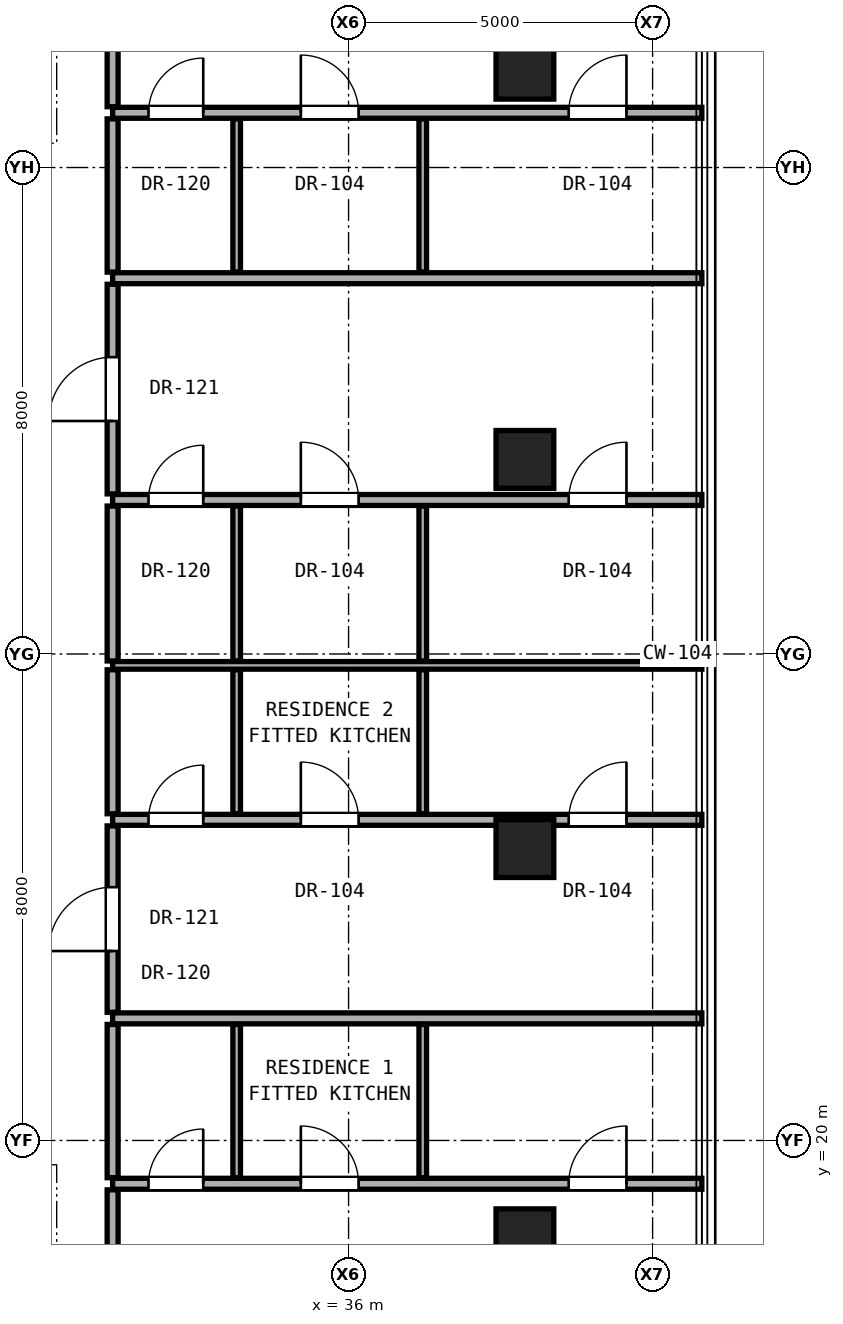
"""IFC4 building model, lengths in metres.
Left out: names, types, materials, properties, quantities, classifications, styles, units other than length and angle.
Written with IfcOpenShell. Run it as: python <this file> out.ifc"""

import sys

from ifc_helpers import new_model, si_unit, direction, frame, frame_2d, origin, origin_2d, place, context, subcontext, project, spatial, rectangle, hollow_rectangle, extrude, element, fill, save


model = new_model("IFC4")
c1 = context("Model", 3, precision=1e-05, world=origin(), true_north=direction((0.0, 1.0)))
c2 = subcontext(c1, "Body", "Model", "MODEL_VIEW")
j1 = project(units=[si_unit("LENGTHUNIT", "METRE"), si_unit("PLANEANGLEUNIT", "RADIAN")], contexts=[c1])
p1 = place(None, origin())
s1 = spatial("IfcSite", under=j1, at=p1, CompositionType="ELEMENT")
p2 = place(p1, origin())
s2 = spatial("IfcBuilding", under=s1, at=p2, CompositionType="ELEMENT")
p3 = place(p2, frame((0.0, 0.0, 173.9)))
s3 = spatial("IfcBuildingStorey", under=s2, at=p3, CompositionType="ELEMENT", Elevation=173.9)
for number, where, z_axis, x_axis in (
    (1, (38.9, 18.4, 0.0), (0.0, 0.0, 1.0), (1.0, 0.0, 0.0)),
    (2, (38.9, 24.8, 0.0), (0.0, 0.0, 1.0), (1.0, 0.0, 0.0)),
    (3, (38.9, 31.2, 0.0), (0.0, 0.0, 1.0), (1.0, 0.0, 0.0)),
    (4, (38.9, 37.6, 0.0), (0.0, 0.0, 1.0), (1.0, 0.0, 0.0)),
):
    element("IfcColumn", number, at=place(p3, frame(where, z_axis=z_axis, x_axis=x_axis)), inside=s3, PredefinedType="COLUMN", context=c2, shape_type="SweptSolid", body=[
        extrude(hollow_rectangle(XDim=0.95, YDim=0.95, WallThickness=0.05, at=origin_2d()), origin(), (0.0, 0.0, 1.0), 3.25),
    ])
p4 = place(p3, frame((32.12, 19.288, 0.0), z_axis=(0.0, 0.0, 1.0), x_axis=(1.0, 0.0, 0.0)))
e5 = element("IfcWall", 5, at=p4, inside=s3, PredefinedType="PARTITIONING", context=c2, shape_type="SweptSolid", body=[
    extrude(rectangle(XDim=9.69, YDim=0.18, at=frame_2d((4.845, 0.0))), origin(), (0.0, 0.0, 1.0), 2.269),
])
p5 = place(p4, frame((7.5, 0.0, 0.0)))
e6 = element("IfcOpeningElement", 6, at=p5, cuts=e5, PredefinedType="OPENING", context=c2, shape_type="SweptSolid", body=[
    extrude(rectangle(XDim=0.95, YDim=2.15, at=frame_2d((0.475, 1.075))), frame((0.0, 0.1, 0.0), z_axis=(0.0, -1.0, 0.0), x_axis=(1.0, 0.0, 0.0)), (0.0, 0.0, 1.0), 0.2),
])
p6 = place(p4, frame((3.095, 0.0, 0.0)))
e7 = element("IfcOpeningElement", 7, at=p6, cuts=e5, PredefinedType="OPENING", context=c2, shape_type="SweptSolid", body=[
    extrude(rectangle(XDim=0.95, YDim=2.15, at=frame_2d((0.475, 1.075))), frame((0.0, 0.1, 0.0), z_axis=(0.0, -1.0, 0.0), x_axis=(1.0, 0.0, 0.0)), (0.0, 0.0, 1.0), 0.2),
])
p7 = place(p4, frame((0.59, 0.0, 0.0)))
e8 = element("IfcOpeningElement", 8, at=p7, cuts=e5, PredefinedType="OPENING", context=c2, shape_type="SweptSolid", body=[
    extrude(rectangle(XDim=0.9, YDim=2.1, at=frame_2d((0.45, 1.05))), frame((0.0, 0.1, 0.0), z_axis=(0.0, -1.0, 0.0), x_axis=(1.0, 0.0, 0.0)), (0.0, 0.0, 1.0), 0.2),
])
p8 = place(p3, frame((32.12, 22.008, 0.0), z_axis=(0.0, 0.0, 1.0), x_axis=(1.0, 0.0, 0.0)))
e9 = element("IfcWall", 9, at=p8, inside=s3, PredefinedType="PARTITIONING", context=c2, shape_type="SweptSolid", body=[
    extrude(rectangle(XDim=9.69, YDim=0.18, at=frame_2d((4.845, 0.0))), origin(), (0.0, 0.0, 1.0), 2.269),
])
p9 = place(p3, frame((32.12, 25.273, 0.0), z_axis=(0.0, 0.0, 1.0), x_axis=(1.0, 0.0, 0.0)))
e10 = element("IfcWall", 10, at=p9, inside=s3, PredefinedType="PARTITIONING", context=c2, shape_type="SweptSolid", body=[
    extrude(rectangle(XDim=9.69, YDim=0.18, at=frame_2d((4.845, 0.0))), origin(), (0.0, 0.0, 1.0), 2.269),
])
p10 = place(p9, frame((7.5, 0.0, 0.0)))
e11 = element("IfcOpeningElement", 11, at=p10, cuts=e10, PredefinedType="OPENING", context=c2, shape_type="SweptSolid", body=[
    extrude(rectangle(XDim=0.95, YDim=2.15, at=frame_2d((0.475, 1.075))), frame((0.0, 0.1, 0.0), z_axis=(0.0, -1.0, 0.0), x_axis=(1.0, 0.0, 0.0)), (0.0, 0.0, 1.0), 0.2),
])
p11 = place(p9, frame((3.095, 0.0, 0.0)))
e12 = element("IfcOpeningElement", 12, at=p11, cuts=e10, PredefinedType="OPENING", context=c2, shape_type="SweptSolid", body=[
    extrude(rectangle(XDim=0.95, YDim=2.15, at=frame_2d((0.475, 1.075))), frame((0.0, 0.1, 0.0), z_axis=(0.0, -1.0, 0.0), x_axis=(1.0, 0.0, 0.0)), (0.0, 0.0, 1.0), 0.2),
])
p12 = place(p9, frame((0.59, 0.0, 0.0)))
e13 = element("IfcOpeningElement", 13, at=p12, cuts=e10, PredefinedType="OPENING", context=c2, shape_type="SweptSolid", body=[
    extrude(rectangle(XDim=0.9, YDim=2.1, at=frame_2d((0.45, 1.05))), frame((0.0, 0.1, 0.0), z_axis=(0.0, -1.0, 0.0), x_axis=(1.0, 0.0, 0.0)), (0.0, 0.0, 1.0), 0.2),
])
p13 = place(p3, frame((32.12, 27.813, 0.0), z_axis=(0.0, 0.0, 1.0), x_axis=(1.0, 0.0, 0.0)))
e14 = element("IfcWall", 14, at=p13, inside=s3, PredefinedType="PARTITIONING", context=c2, shape_type="SweptSolid", body=[
    extrude(rectangle(XDim=9.69, YDim=0.125, at=frame_2d((4.845, 0.0))), origin(), (0.0, 0.0, 1.0), 2.269),
])
p14 = place(p3, frame((32.12, 30.533, 0.0), z_axis=(0.0, 0.0, 1.0), x_axis=(1.0, 0.0, 0.0)))
e15 = element("IfcWall", 15, at=p14, inside=s3, PredefinedType="PARTITIONING", context=c2, shape_type="SweptSolid", body=[
    extrude(rectangle(XDim=9.69, YDim=0.18, at=frame_2d((4.845, 0.0))), origin(), (0.0, 0.0, 1.0), 2.269),
])
p15 = place(p14, frame((7.5, 0.0, 0.0)))
e16 = element("IfcOpeningElement", 16, at=p15, cuts=e15, PredefinedType="OPENING", context=c2, shape_type="SweptSolid", body=[
    extrude(rectangle(XDim=0.95, YDim=2.15, at=frame_2d((0.475, 1.075))), frame((0.0, 0.1, 0.0), z_axis=(0.0, -1.0, 0.0), x_axis=(1.0, 0.0, 0.0)), (0.0, 0.0, 1.0), 0.2),
])
p16 = place(p14, frame((3.095, 0.0, 0.0)))
e17 = element("IfcOpeningElement", 17, at=p16, cuts=e15, PredefinedType="OPENING", context=c2, shape_type="SweptSolid", body=[
    extrude(rectangle(XDim=0.95, YDim=2.15, at=frame_2d((0.475, 1.075))), frame((0.0, 0.1, 0.0), z_axis=(0.0, -1.0, 0.0), x_axis=(1.0, 0.0, 0.0)), (0.0, 0.0, 1.0), 0.2),
])
p17 = place(p14, frame((0.59, 0.0, 0.0)))
e18 = element("IfcOpeningElement", 18, at=p17, cuts=e15, PredefinedType="OPENING", context=c2, shape_type="SweptSolid", body=[
    extrude(rectangle(XDim=0.9, YDim=2.1, at=frame_2d((0.45, 1.05))), frame((0.0, 0.1, 0.0), z_axis=(0.0, -1.0, 0.0), x_axis=(1.0, 0.0, 0.0)), (0.0, 0.0, 1.0), 0.2),
])
p18 = place(p3, frame((32.12, 34.18, 0.0), z_axis=(0.0, 0.0, 1.0), x_axis=(1.0, 0.0, 0.0)))
e19 = element("IfcWall", 19, at=p18, inside=s3, PredefinedType="PARTITIONING", context=c2, shape_type="SweptSolid", body=[
    extrude(rectangle(XDim=9.69, YDim=0.18, at=frame_2d((4.845, 0.0))), origin(), (0.0, 0.0, 1.0), 2.269),
])
p19 = place(p3, frame((32.12, 36.9, 0.0), z_axis=(0.0, 0.0, 1.0), x_axis=(1.0, 0.0, 0.0)))
e20 = element("IfcWall", 20, at=p19, inside=s3, PredefinedType="PARTITIONING", context=c2, shape_type="SweptSolid", body=[
    extrude(rectangle(XDim=9.69, YDim=0.18, at=frame_2d((4.845, 0.0))), origin(), (0.0, 0.0, 1.0), 2.269),
])
p20 = place(p19, frame((7.5, 0.0, 0.0)))
e21 = element("IfcOpeningElement", 21, at=p20, cuts=e20, PredefinedType="OPENING", context=c2, shape_type="SweptSolid", body=[
    extrude(rectangle(XDim=0.95, YDim=2.15, at=frame_2d((0.475, 1.075))), frame((0.0, 0.1, 0.0), z_axis=(0.0, -1.0, 0.0), x_axis=(1.0, 0.0, 0.0)), (0.0, 0.0, 1.0), 0.2),
])
p21 = place(p19, frame((3.095, 0.0, 0.0)))
e22 = element("IfcOpeningElement", 22, at=p21, cuts=e20, PredefinedType="OPENING", context=c2, shape_type="SweptSolid", body=[
    extrude(rectangle(XDim=0.95, YDim=2.15, at=frame_2d((0.475, 1.075))), frame((0.0, 0.1, 0.0), z_axis=(0.0, -1.0, 0.0), x_axis=(1.0, 0.0, 0.0)), (0.0, 0.0, 1.0), 0.2),
])
p22 = place(p19, frame((0.59, 0.0, 0.0)))
e23 = element("IfcOpeningElement", 23, at=p22, cuts=e20, PredefinedType="OPENING", context=c2, shape_type="SweptSolid", body=[
    extrude(rectangle(XDim=0.9, YDim=2.1, at=frame_2d((0.45, 1.05))), frame((0.0, 0.1, 0.0), z_axis=(0.0, -1.0, 0.0), x_axis=(1.0, 0.0, 0.0)), (0.0, 0.0, 1.0), 0.2),
])
p23 = place(p3, frame((32.12, 14.587, 0.0), z_axis=(0.0, 0.0, 1.0), x_axis=(0.0, 1.0, 0.0)))
e24 = element("IfcWall", 24, at=p23, inside=s3, PredefinedType="PARTITIONING", context=c2, shape_type="SweptSolid", body=[
    extrude(rectangle(XDim=4.601, YDim=0.18, at=frame_2d((2.301, 0.0))), origin(), (0.0, 0.0, 1.0), 2.442),
])
p24 = place(p23, frame((2.075, 0.0, 0.0)))
e25 = element("IfcOpeningElement", 25, at=p24, cuts=e24, PredefinedType="OPENING", context=c2, shape_type="SweptSolid", body=[
    extrude(rectangle(XDim=1.05, YDim=2.2, at=frame_2d((0.525, 1.1))), frame((0.0, 0.1, 0.0), z_axis=(0.0, -1.0, 0.0), x_axis=(1.0, 0.0, 0.0)), (0.0, 0.0, 1.0), 0.2),
])
p25 = place(p3, frame((32.12, 19.388, 0.0), z_axis=(0.0, 0.0, 1.0), x_axis=(0.0, 1.0, 0.0)))
e26 = element("IfcWall", 26, at=p25, inside=s3, PredefinedType="PARTITIONING", context=c2, shape_type="SweptSolid", body=[
    extrude(rectangle(XDim=2.52, YDim=0.18, at=frame_2d((1.26, 0.0))), origin(), (0.0, 0.0, 1.0), 3.05),
])
p26 = place(p3, frame((32.12, 22.108, 0.0), z_axis=(0.0, 0.0, 1.0), x_axis=(0.0, 1.0, 0.0)))
e27 = element("IfcWall", 27, at=p26, inside=s3, PredefinedType="PARTITIONING", context=c2, shape_type="SweptSolid", body=[
    extrude(rectangle(XDim=3.065, YDim=0.18, at=frame_2d((1.533, 0.0))), origin(), (0.0, 0.0, 1.0), 2.346),
])
p27 = place(p26, frame((1.008, 0.0, 0.0)))
e28 = element("IfcOpeningElement", 28, at=p27, cuts=e27, PredefinedType="OPENING", context=c2, shape_type="SweptSolid", body=[
    extrude(rectangle(XDim=1.05, YDim=2.2, at=frame_2d((0.525, 1.1))), frame((0.0, 0.1, 0.0), z_axis=(0.0, -1.0, 0.0), x_axis=(1.0, 0.0, 0.0)), (0.0, 0.0, 1.0), 0.2),
])
p28 = place(p3, frame((32.12, 25.373, 0.0), z_axis=(0.0, 0.0, 1.0), x_axis=(0.0, 1.0, 0.0)))
e29 = element("IfcWall", 29, at=p28, inside=s3, PredefinedType="PARTITIONING", context=c2, shape_type="SweptSolid", body=[
    extrude(rectangle(XDim=2.367, YDim=0.18, at=frame_2d((1.184, 0.0))), origin(), (0.0, 0.0, 1.0), 3.05),
])
p29 = place(p3, frame((32.12, 27.885, 0.0), z_axis=(0.0, 0.0, 1.0), x_axis=(0.0, 1.0, 0.0)))
e30 = element("IfcWall", 30, at=p29, inside=s3, PredefinedType="PARTITIONING", context=c2, shape_type="SweptSolid", body=[
    extrude(rectangle(XDim=2.548, YDim=0.18, at=frame_2d((1.274, 0.0))), origin(), (0.0, 0.0, 1.0), 3.05),
])
p30 = place(p3, frame((32.12, 30.633, 0.0), z_axis=(0.0, 0.0, 1.0), x_axis=(0.0, 1.0, 0.0)))
e31 = element("IfcWall", 31, at=p30, inside=s3, PredefinedType="PARTITIONING", context=c2, shape_type="SweptSolid", body=[
    extrude(rectangle(XDim=3.447, YDim=0.18, at=frame_2d((1.724, 0.0))), origin(), (0.0, 0.0, 1.0), 2.346),
])
p31 = place(p30, frame((1.198, 0.0, 0.0)))
e32 = element("IfcOpeningElement", 32, at=p31, cuts=e31, PredefinedType="OPENING", context=c2, shape_type="SweptSolid", body=[
    extrude(rectangle(XDim=1.05, YDim=2.2, at=frame_2d((0.525, 1.1))), frame((0.0, 0.1, 0.0), z_axis=(0.0, -1.0, 0.0), x_axis=(1.0, 0.0, 0.0)), (0.0, 0.0, 1.0), 0.2),
])
p32 = place(p3, frame((32.12, 34.28, 0.0), z_axis=(0.0, 0.0, 1.0), x_axis=(0.0, 1.0, 0.0)))
e33 = element("IfcWall", 33, at=p32, inside=s3, PredefinedType="PARTITIONING", context=c2, shape_type="SweptSolid", body=[
    extrude(rectangle(XDim=2.52, YDim=0.18, at=frame_2d((1.26, 0.0))), origin(), (0.0, 0.0, 1.0), 3.05),
])
p33 = place(p3, frame((32.12, 37.0, 0.0), z_axis=(0.0, 0.0, 1.0), x_axis=(0.0, 1.0, 0.0)))
e34 = element("IfcWall", 34, at=p33, inside=s3, PredefinedType="PARTITIONING", context=c2, shape_type="SweptSolid", body=[
    extrude(rectangle(XDim=4.413, YDim=0.18, at=frame_2d((2.207, 0.0))), origin(), (0.0, 0.0, 1.0), 2.442),
])
p34 = place(p33, frame((1.082, 0.0, 0.0)))
e35 = element("IfcOpeningElement", 35, at=p34, cuts=e34, PredefinedType="OPENING", context=c2, shape_type="SweptSolid", body=[
    extrude(rectangle(XDim=1.05, YDim=2.2, at=frame_2d((0.525, 1.1))), frame((0.0, 0.1, 0.0), z_axis=(0.0, -1.0, 0.0), x_axis=(1.0, 0.0, 0.0)), (0.0, 0.0, 1.0), 0.2),
])
p35 = place(p3, frame((34.16, 19.388, 0.0), z_axis=(0.0, 0.0, 1.0), x_axis=(0.0, 1.0, 0.0)))
e36 = element("IfcWall", 36, at=p35, inside=s3, PredefinedType="PARTITIONING", context=c2, shape_type="SweptSolid", body=[
    extrude(rectangle(XDim=2.52, YDim=0.125, at=frame_2d((1.26, 0.0))), origin(), (0.0, 0.0, 1.0), 3.05),
])
p36 = place(p3, frame((34.16, 25.373, 0.0), z_axis=(0.0, 0.0, 1.0), x_axis=(0.0, 1.0, 0.0)))
e37 = element("IfcWall", 37, at=p36, inside=s3, PredefinedType="PARTITIONING", context=c2, shape_type="SweptSolid", body=[
    extrude(rectangle(XDim=2.367, YDim=0.125, at=frame_2d((1.184, 0.0))), origin(), (0.0, 0.0, 1.0), 3.05),
])
p37 = place(p3, frame((34.16, 27.885, 0.0), z_axis=(0.0, 0.0, 1.0), x_axis=(0.0, 1.0, 0.0)))
e38 = element("IfcWall", 38, at=p37, inside=s3, PredefinedType="PARTITIONING", context=c2, shape_type="SweptSolid", body=[
    extrude(rectangle(XDim=2.548, YDim=0.125, at=frame_2d((1.274, 0.0))), origin(), (0.0, 0.0, 1.0), 3.05),
])
for number, where, z_axis, x_axis in (
    (39, (34.16, 34.28, 0.0), (0.0, 0.0, 1.0), (0.0, 1.0, 0.0)),
    (40, (37.22, 19.388, 0.0), (0.0, 0.0, 1.0), (0.0, 1.0, 0.0)),
):
    element("IfcWall", number, at=place(p3, frame(where, z_axis=z_axis, x_axis=x_axis)), inside=s3, PredefinedType="PARTITIONING", context=c2, shape_type="SweptSolid", body=[
        extrude(rectangle(XDim=2.52, YDim=0.125, at=frame_2d((1.26, 0.0))), origin(), (0.0, 0.0, 1.0), 3.05),
    ])
p38 = place(p3, frame((37.22, 25.373, 0.0), z_axis=(0.0, 0.0, 1.0), x_axis=(0.0, 1.0, 0.0)))
e41 = element("IfcWall", 41, at=p38, inside=s3, PredefinedType="PARTITIONING", context=c2, shape_type="SweptSolid", body=[
    extrude(rectangle(XDim=2.367, YDim=0.125, at=frame_2d((1.184, 0.0))), origin(), (0.0, 0.0, 1.0), 3.05),
])
p39 = place(p3, frame((37.22, 27.885, 0.0), z_axis=(0.0, 0.0, 1.0), x_axis=(0.0, 1.0, 0.0)))
e42 = element("IfcWall", 42, at=p39, inside=s3, PredefinedType="PARTITIONING", context=c2, shape_type="SweptSolid", body=[
    extrude(rectangle(XDim=2.548, YDim=0.125, at=frame_2d((1.274, 0.0))), origin(), (0.0, 0.0, 1.0), 3.05),
])
p40 = place(p3, frame((37.22, 34.28, 0.0), z_axis=(0.0, 0.0, 1.0), x_axis=(0.0, 1.0, 0.0)))
e43 = element("IfcWall", 43, at=p40, inside=s3, PredefinedType="PARTITIONING", context=c2, shape_type="SweptSolid", body=[
    extrude(rectangle(XDim=2.52, YDim=0.125, at=frame_2d((1.26, 0.0))), origin(), (0.0, 0.0, 1.0), 3.05),
])
p41 = place(p5, origin())
e44 = element("IfcDoor", 44, at=p41, inside=s3, OperationType="SINGLE_SWING_RIGHT", PredefinedType="DOOR", context=c2, shape_type="SweptSolid", body=[
    extrude(rectangle(XDim=0.95, YDim=2.15, at=frame_2d((0.475, 1.075))), frame((0.0, 0.025, 0.0), z_axis=(0.0, -1.0, 0.0), x_axis=(1.0, 0.0, 0.0)), (0.0, 0.0, 1.0), 0.05),
])
fill(e6, e44)
p42 = place(p6, origin())
e45 = element("IfcDoor", 45, at=p42, inside=s3, OperationType="SINGLE_SWING_LEFT", PredefinedType="DOOR", context=c2, shape_type="SweptSolid", body=[
    extrude(rectangle(XDim=0.95, YDim=2.15, at=frame_2d((0.475, 1.075))), frame((0.0, 0.025, 0.0), z_axis=(0.0, -1.0, 0.0), x_axis=(1.0, 0.0, 0.0)), (0.0, 0.0, 1.0), 0.05),
])
fill(e7, e45)
p43 = place(p7, origin())
e46 = element("IfcDoor", 46, at=p43, inside=s3, OperationType="SINGLE_SWING_RIGHT", PredefinedType="DOOR", context=c2, shape_type="SweptSolid", body=[
    extrude(rectangle(XDim=0.9, YDim=2.1, at=frame_2d((0.45, 1.05))), frame((0.0, 0.025, 0.0), z_axis=(0.0, -1.0, 0.0), x_axis=(1.0, 0.0, 0.0)), (0.0, 0.0, 1.0), 0.05),
])
fill(e8, e46)
p44 = place(p27, origin())
e47 = element("IfcDoor", 47, at=p44, inside=s3, OperationType="SINGLE_SWING_LEFT", PredefinedType="DOOR", context=c2, shape_type="SweptSolid", body=[
    extrude(rectangle(XDim=1.05, YDim=2.2, at=frame_2d((0.525, 1.1))), frame((0.0, 0.025, 0.0), z_axis=(0.0, -1.0, 0.0), x_axis=(1.0, 0.0, 0.0)), (0.0, 0.0, 1.0), 0.05),
])
fill(e28, e47)
p45 = place(p10, origin())
e48 = element("IfcDoor", 48, at=p45, inside=s3, OperationType="SINGLE_SWING_RIGHT", PredefinedType="DOOR", context=c2, shape_type="SweptSolid", body=[
    extrude(rectangle(XDim=0.95, YDim=2.15, at=frame_2d((0.475, 1.075))), frame((0.0, 0.025, 0.0), z_axis=(0.0, -1.0, 0.0), x_axis=(1.0, 0.0, 0.0)), (0.0, 0.0, 1.0), 0.05),
])
fill(e11, e48)
p46 = place(p11, origin())
e49 = element("IfcDoor", 49, at=p46, inside=s3, OperationType="SINGLE_SWING_LEFT", PredefinedType="DOOR", context=c2, shape_type="SweptSolid", body=[
    extrude(rectangle(XDim=0.95, YDim=2.15, at=frame_2d((0.475, 1.075))), frame((0.0, 0.025, 0.0), z_axis=(0.0, -1.0, 0.0), x_axis=(1.0, 0.0, 0.0)), (0.0, 0.0, 1.0), 0.05),
])
fill(e12, e49)
p47 = place(p12, origin())
e50 = element("IfcDoor", 50, at=p47, inside=s3, OperationType="SINGLE_SWING_RIGHT", PredefinedType="DOOR", context=c2, shape_type="SweptSolid", body=[
    extrude(rectangle(XDim=0.9, YDim=2.1, at=frame_2d((0.45, 1.05))), frame((0.0, 0.025, 0.0), z_axis=(0.0, -1.0, 0.0), x_axis=(1.0, 0.0, 0.0)), (0.0, 0.0, 1.0), 0.05),
])
fill(e13, e50)
p48 = place(p31, origin())
e51 = element("IfcDoor", 51, at=p48, inside=s3, OperationType="SINGLE_SWING_LEFT", PredefinedType="DOOR", context=c2, shape_type="SweptSolid", body=[
    extrude(rectangle(XDim=1.05, YDim=2.2, at=frame_2d((0.525, 1.1))), frame((0.0, 0.025, 0.0), z_axis=(0.0, -1.0, 0.0), x_axis=(1.0, 0.0, 0.0)), (0.0, 0.0, 1.0), 0.05),
])
fill(e32, e51)
p49 = place(p15, origin())
e52 = element("IfcDoor", 52, at=p49, inside=s3, OperationType="SINGLE_SWING_RIGHT", PredefinedType="DOOR", context=c2, shape_type="SweptSolid", body=[
    extrude(rectangle(XDim=0.95, YDim=2.15, at=frame_2d((0.475, 1.075))), frame((0.0, 0.025, 0.0), z_axis=(0.0, -1.0, 0.0), x_axis=(1.0, 0.0, 0.0)), (0.0, 0.0, 1.0), 0.05),
])
fill(e16, e52)
p50 = place(p16, origin())
e53 = element("IfcDoor", 53, at=p50, inside=s3, OperationType="SINGLE_SWING_LEFT", PredefinedType="DOOR", context=c2, shape_type="SweptSolid", body=[
    extrude(rectangle(XDim=0.95, YDim=2.15, at=frame_2d((0.475, 1.075))), frame((0.0, 0.025, 0.0), z_axis=(0.0, -1.0, 0.0), x_axis=(1.0, 0.0, 0.0)), (0.0, 0.0, 1.0), 0.05),
])
fill(e17, e53)
p51 = place(p17, origin())
e54 = element("IfcDoor", 54, at=p51, inside=s3, OperationType="SINGLE_SWING_RIGHT", PredefinedType="DOOR", context=c2, shape_type="SweptSolid", body=[
    extrude(rectangle(XDim=0.9, YDim=2.1, at=frame_2d((0.45, 1.05))), frame((0.0, 0.025, 0.0), z_axis=(0.0, -1.0, 0.0), x_axis=(1.0, 0.0, 0.0)), (0.0, 0.0, 1.0), 0.05),
])
fill(e18, e54)
p52 = place(p20, origin())
e55 = element("IfcDoor", 55, at=p52, inside=s3, OperationType="SINGLE_SWING_RIGHT", PredefinedType="DOOR", context=c2, shape_type="SweptSolid", body=[
    extrude(rectangle(XDim=0.95, YDim=2.15, at=frame_2d((0.475, 1.075))), frame((0.0, 0.025, 0.0), z_axis=(0.0, -1.0, 0.0), x_axis=(1.0, 0.0, 0.0)), (0.0, 0.0, 1.0), 0.05),
])
fill(e21, e55)
p53 = place(p21, origin())
e56 = element("IfcDoor", 56, at=p53, inside=s3, OperationType="SINGLE_SWING_LEFT", PredefinedType="DOOR", context=c2, shape_type="SweptSolid", body=[
    extrude(rectangle(XDim=0.95, YDim=2.15, at=frame_2d((0.475, 1.075))), frame((0.0, 0.025, 0.0), z_axis=(0.0, -1.0, 0.0), x_axis=(1.0, 0.0, 0.0)), (0.0, 0.0, 1.0), 0.05),
])
fill(e22, e56)
p54 = place(p22, origin())
e57 = element("IfcDoor", 57, at=p54, inside=s3, OperationType="SINGLE_SWING_RIGHT", PredefinedType="DOOR", context=c2, shape_type="SweptSolid", body=[
    extrude(rectangle(XDim=0.9, YDim=2.1, at=frame_2d((0.45, 1.05))), frame((0.0, 0.025, 0.0), z_axis=(0.0, -1.0, 0.0), x_axis=(1.0, 0.0, 0.0)), (0.0, 0.0, 1.0), 0.05),
])
fill(e23, e57)
save(model, sys.argv[1])
